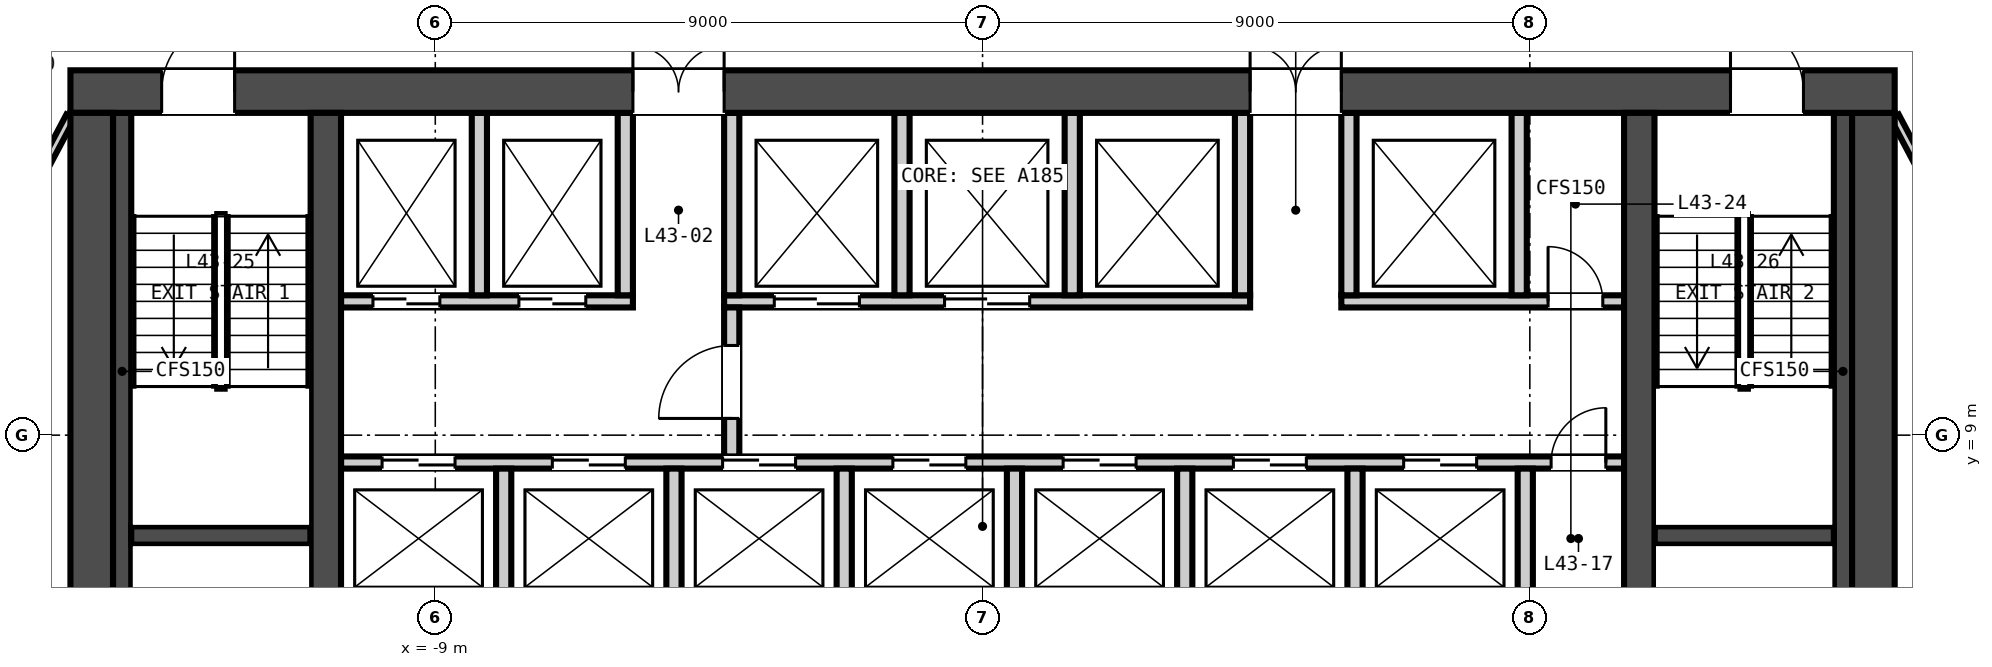
"""IFC4 building model, lengths in metres.
Left out: names, types, materials, properties, quantities, classifications, styles, units other than length and angle.
Written with IfcOpenShell. Run it as: python <this file> out.ifc"""

import sys

from ifc_helpers import new_model, si_unit, direction, frame, frame_2d, origin, place, context, subcontext, project, spatial, rectangle, extrude, element, fill, save


model = new_model("IFC4")
c1 = context("Model", 3, precision=1e-05, world=origin(), true_north=direction((0.0, 1.0)))
c2 = subcontext(c1, "Body", "Model", "MODEL_VIEW")
j1 = project(units=[si_unit("LENGTHUNIT", "METRE"), si_unit("PLANEANGLEUNIT", "RADIAN")], contexts=[c1])
p1 = place(None, origin())
s1 = spatial("IfcSite", under=j1, at=p1, CompositionType="ELEMENT")
p2 = place(p1, origin())
s2 = spatial("IfcBuilding", under=s1, at=p2, CompositionType="ELEMENT")
p3 = place(p2, frame((0.0, 0.0, 174.45)))
s3 = spatial("IfcBuildingStorey", under=s2, at=p3, CompositionType="ELEMENT", Elevation=174.45)
p4 = place(p3, frame((-15.0, 14.65, -0.15), z_axis=(0.0, 0.0, 1.0), x_axis=(1.0, 0.0, 0.0)))
e1 = element("IfcWall", 1, at=p4, inside=s3, PredefinedType="SOLIDWALL", context=c2, shape_type="SweptSolid", body=[
    extrude(rectangle(XDim=30.0, YDim=0.7, at=frame_2d((15.0, 0.0))), origin(), (0.0, 0.0, 1.0), 3.65),
])
p5 = place(p4, frame((9.25, 0.0, 0.15)))
e2 = element("IfcOpeningElement", 2, at=p5, cuts=e1, PredefinedType="OPENING", context=c2, shape_type="SweptSolid", body=[
    extrude(rectangle(XDim=1.5, YDim=2.1, at=frame_2d((0.75, 1.05))), frame((0.0, 0.36, 0.0), z_axis=(0.0, -1.0, 0.0), x_axis=(1.0, 0.0, 0.0)), (0.0, 0.0, 1.0), 0.72),
])
p6 = place(p4, frame((19.4, 0.0, 0.15)))
e3 = element("IfcOpeningElement", 3, at=p6, cuts=e1, PredefinedType="OPENING", context=c2, shape_type="SweptSolid", body=[
    extrude(rectangle(XDim=1.5, YDim=2.1, at=frame_2d((0.75, 1.05))), frame((0.0, 0.36, 0.0), z_axis=(0.0, -1.0, 0.0), x_axis=(1.0, 0.0, 0.0)), (0.0, 0.0, 1.0), 0.72),
])
p7 = place(p4, frame((1.5, 0.0, 0.15)))
e4 = element("IfcOpeningElement", 4, at=p7, cuts=e1, PredefinedType="OPENING", context=c2, shape_type="SweptSolid", body=[
    extrude(rectangle(XDim=1.2, YDim=2.1, at=frame_2d((0.6, 1.05))), frame((0.0, 0.36, 0.0), z_axis=(0.0, -1.0, 0.0), x_axis=(1.0, 0.0, 0.0)), (0.0, 0.0, 1.0), 0.72),
])
p8 = place(p4, frame((27.3, 0.0, 0.15)))
e5 = element("IfcOpeningElement", 5, at=p8, cuts=e1, PredefinedType="OPENING", context=c2, shape_type="SweptSolid", body=[
    extrude(rectangle(XDim=1.2, YDim=2.1, at=frame_2d((0.6, 1.05))), frame((0.0, 0.36, 0.0), z_axis=(0.0, -1.0, 0.0), x_axis=(1.0, 0.0, 0.0)), (0.0, 0.0, 1.0), 0.72),
])
for number, where, z_axis, x_axis in (
    (6, (-14.65, 0.7, -0.15), (0.0, 0.0, 1.0), (0.0, 1.0, 0.0)),
    (7, (14.65, 0.7, -0.15), (0.0, 0.0, 1.0), (0.0, 1.0, 0.0)),
):
    element("IfcWall", number, at=place(p3, frame(where, z_axis=z_axis, x_axis=x_axis)), inside=s3, PredefinedType="SOLIDWALL", context=c2, shape_type="SweptSolid", body=[
        extrude(rectangle(XDim=13.6, YDim=0.7, at=frame_2d((6.8, 0.0))), origin(), (0.0, 0.0, 1.0), 3.65),
    ])
for number, where, z_axis, x_axis in (
    (8, (-10.8, 0.7, -0.15), (0.0, 0.0, 1.0), (0.0, 1.0, 0.0)),
    (9, (10.8, 0.7, -0.15), (0.0, 0.0, 1.0), (0.0, 1.0, 0.0)),
):
    element("IfcWall", number, at=place(p3, frame(where, z_axis=z_axis, x_axis=x_axis)), inside=s3, PredefinedType="SOLIDWALL", context=c2, shape_type="SweptSolid", body=[
        extrude(rectangle(XDim=13.6, YDim=0.5, at=frame_2d((6.8, 0.0))), origin(), (0.0, 0.0, 1.0), 3.65),
    ])
p9 = place(p3, frame((-10.55, 8.55, 0.0), z_axis=(0.0, 0.0, 1.0), x_axis=(1.0, 0.0, 0.0)))
e10 = element("IfcWall", 10, at=p9, inside=s3, PredefinedType="PARTITIONING", context=c2, shape_type="SweptSolid", body=[
    extrude(rectangle(XDim=21.1, YDim=0.2, at=frame_2d((10.55, 0.0))), origin(), (0.0, 0.0, 1.0), 3.5),
])
p10 = place(p9, frame((0.675, 0.0, 0.0)))
e11 = element("IfcOpeningElement", 11, at=p10, cuts=e10, PredefinedType="OPENING", context=c2, shape_type="SweptSolid", body=[
    extrude(rectangle(XDim=1.2, YDim=2.1, at=frame_2d((0.6, 1.05))), frame((0.0, 0.11, 0.0), z_axis=(0.0, -1.0, 0.0), x_axis=(1.0, 0.0, 0.0)), (0.0, 0.0, 1.0), 0.22),
])
p11 = place(p9, frame((3.475, 0.0, 0.0)))
e12 = element("IfcOpeningElement", 12, at=p11, cuts=e10, PredefinedType="OPENING", context=c2, shape_type="SweptSolid", body=[
    extrude(rectangle(XDim=1.2, YDim=2.1, at=frame_2d((0.6, 1.05))), frame((0.0, 0.11, 0.0), z_axis=(0.0, -1.0, 0.0), x_axis=(1.0, 0.0, 0.0)), (0.0, 0.0, 1.0), 0.22),
])
p12 = place(p9, frame((6.275, 0.0, 0.0)))
e13 = element("IfcOpeningElement", 13, at=p12, cuts=e10, PredefinedType="OPENING", context=c2, shape_type="SweptSolid", body=[
    extrude(rectangle(XDim=1.2, YDim=2.1, at=frame_2d((0.6, 1.05))), frame((0.0, 0.11, 0.0), z_axis=(0.0, -1.0, 0.0), x_axis=(1.0, 0.0, 0.0)), (0.0, 0.0, 1.0), 0.22),
])
p13 = place(p9, frame((9.075, 0.0, 0.0)))
e14 = element("IfcOpeningElement", 14, at=p13, cuts=e10, PredefinedType="OPENING", context=c2, shape_type="SweptSolid", body=[
    extrude(rectangle(XDim=1.2, YDim=2.1, at=frame_2d((0.6, 1.05))), frame((0.0, 0.11, 0.0), z_axis=(0.0, -1.0, 0.0), x_axis=(1.0, 0.0, 0.0)), (0.0, 0.0, 1.0), 0.22),
])
p14 = place(p9, frame((11.875, 0.0, 0.0)))
e15 = element("IfcOpeningElement", 15, at=p14, cuts=e10, PredefinedType="OPENING", context=c2, shape_type="SweptSolid", body=[
    extrude(rectangle(XDim=1.2, YDim=2.1, at=frame_2d((0.6, 1.05))), frame((0.0, 0.11, 0.0), z_axis=(0.0, -1.0, 0.0), x_axis=(1.0, 0.0, 0.0)), (0.0, 0.0, 1.0), 0.22),
])
p15 = place(p9, frame((14.675, 0.0, 0.0)))
e16 = element("IfcOpeningElement", 16, at=p15, cuts=e10, PredefinedType="OPENING", context=c2, shape_type="SweptSolid", body=[
    extrude(rectangle(XDim=1.2, YDim=2.1, at=frame_2d((0.6, 1.05))), frame((0.0, 0.11, 0.0), z_axis=(0.0, -1.0, 0.0), x_axis=(1.0, 0.0, 0.0)), (0.0, 0.0, 1.0), 0.22),
])
p16 = place(p9, frame((17.475, 0.0, 0.0)))
e17 = element("IfcOpeningElement", 17, at=p16, cuts=e10, PredefinedType="OPENING", context=c2, shape_type="SweptSolid", body=[
    extrude(rectangle(XDim=1.2, YDim=2.1, at=frame_2d((0.6, 1.05))), frame((0.0, 0.11, 0.0), z_axis=(0.0, -1.0, 0.0), x_axis=(1.0, 0.0, 0.0)), (0.0, 0.0, 1.0), 0.22),
])
p17 = place(p9, frame((19.9, 0.0, 0.0)))
e18 = element("IfcOpeningElement", 18, at=p17, cuts=e10, PredefinedType="OPENING", context=c2, shape_type="SweptSolid", body=[
    extrude(rectangle(XDim=0.9, YDim=2.1, at=frame_2d((0.45, 1.05))), frame((0.0, 0.11, 0.0), z_axis=(0.0, -1.0, 0.0), x_axis=(1.0, 0.0, 0.0)), (0.0, 0.0, 1.0), 0.22),
])
p18 = place(p3, frame((-10.55, 11.2, 0.0), z_axis=(0.0, 0.0, 1.0), x_axis=(1.0, 0.0, 0.0)))
e19 = element("IfcWall", 19, at=p18, inside=s3, PredefinedType="PARTITIONING", context=c2, shape_type="SweptSolid", body=[
    extrude(rectangle(XDim=4.8, YDim=0.2, at=frame_2d((2.4, 0.0))), origin(), (0.0, 0.0, 1.0), 3.5),
])
p19 = place(p18, frame((0.525, 0.0, 0.0)))
e20 = element("IfcOpeningElement", 20, at=p19, cuts=e19, PredefinedType="OPENING", context=c2, shape_type="SweptSolid", body=[
    extrude(rectangle(XDim=1.1, YDim=2.1, at=frame_2d((0.55, 1.05))), frame((0.0, 0.11, 0.0), z_axis=(0.0, -1.0, 0.0), x_axis=(1.0, 0.0, 0.0)), (0.0, 0.0, 1.0), 0.22),
])
p20 = place(p18, frame((2.925, 0.0, 0.0)))
e21 = element("IfcOpeningElement", 21, at=p20, cuts=e19, PredefinedType="OPENING", context=c2, shape_type="SweptSolid", body=[
    extrude(rectangle(XDim=1.1, YDim=2.1, at=frame_2d((0.55, 1.05))), frame((0.0, 0.11, 0.0), z_axis=(0.0, -1.0, 0.0), x_axis=(1.0, 0.0, 0.0)), (0.0, 0.0, 1.0), 0.22),
])
p21 = place(p3, frame((-4.25, 11.2, 0.0), z_axis=(0.0, 0.0, 1.0), x_axis=(1.0, 0.0, 0.0)))
e22 = element("IfcWall", 22, at=p21, inside=s3, PredefinedType="PARTITIONING", context=c2, shape_type="SweptSolid", body=[
    extrude(rectangle(XDim=8.65, YDim=0.2, at=frame_2d((4.325, 0.0))), origin(), (0.0, 0.0, 1.0), 3.5),
])
p22 = place(p21, frame((0.825, 0.0, 0.0)))
e23 = element("IfcOpeningElement", 23, at=p22, cuts=e22, PredefinedType="OPENING", context=c2, shape_type="SweptSolid", body=[
    extrude(rectangle(XDim=1.4, YDim=2.1, at=frame_2d((0.7, 1.05))), frame((0.0, 0.11, 0.0), z_axis=(0.0, -1.0, 0.0), x_axis=(1.0, 0.0, 0.0)), (0.0, 0.0, 1.0), 0.22),
])
p23 = place(p21, frame((3.625, 0.0, 0.0)))
e24 = element("IfcOpeningElement", 24, at=p23, cuts=e22, PredefinedType="OPENING", context=c2, shape_type="SweptSolid", body=[
    extrude(rectangle(XDim=1.4, YDim=2.1, at=frame_2d((0.7, 1.05))), frame((0.0, 0.11, 0.0), z_axis=(0.0, -1.0, 0.0), x_axis=(1.0, 0.0, 0.0)), (0.0, 0.0, 1.0), 0.22),
])
p24 = place(p3, frame((5.9, 11.2, 0.0), z_axis=(0.0, 0.0, 1.0), x_axis=(1.0, 0.0, 0.0)))
e25 = element("IfcWall", 25, at=p24, inside=s3, PredefinedType="PARTITIONING", context=c2, shape_type="SweptSolid", body=[
    extrude(rectangle(XDim=4.65, YDim=0.2, at=frame_2d((2.325, 0.0))), origin(), (0.0, 0.0, 1.0), 3.5),
])
p25 = place(p24, frame((3.4, 0.0, 0.0)))
e26 = element("IfcOpeningElement", 26, at=p25, cuts=e25, PredefinedType="OPENING", context=c2, shape_type="SweptSolid", body=[
    extrude(rectangle(XDim=0.9, YDim=2.1, at=frame_2d((0.45, 1.05))), frame((0.0, 0.11, 0.0), z_axis=(0.0, -1.0, 0.0), x_axis=(1.0, 0.0, 0.0)), (0.0, 0.0, 1.0), 0.22),
])
p26 = place(p3, frame((-4.125, 8.65, 0.0), z_axis=(0.0, 0.0, 1.0), x_axis=(0.0, 1.0, 0.0)))
e27 = element("IfcWall", 27, at=p26, inside=s3, PredefinedType="PARTITIONING", context=c2, shape_type="SweptSolid", body=[
    extrude(rectangle(XDim=2.45, YDim=0.25, at=frame_2d((1.225, 0.0))), origin(), (0.0, 0.0, 1.0), 3.5),
])
p27 = place(p26, frame((0.625, 0.0, 0.0)))
e28 = element("IfcOpeningElement", 28, at=p27, cuts=e27, PredefinedType="OPENING", context=c2, shape_type="SweptSolid", body=[
    extrude(rectangle(XDim=1.2, YDim=2.1, at=frame_2d((0.6, 1.05))), frame((0.0, 0.135, 0.0), z_axis=(0.0, -1.0, 0.0), x_axis=(1.0, 0.0, 0.0)), (0.0, 0.0, 1.0), 0.27),
])
for number, where, z_axis, x_axis in (
    (29, (-7.875, 6.15, 0.0), (0.0, 0.0, 1.0), (0.0, 1.0, 0.0)),
    (30, (-5.075, 6.15, 0.0), (0.0, 0.0, 1.0), (0.0, 1.0, 0.0)),
    (31, (-2.275, 6.15, 0.0), (0.0, 0.0, 1.0), (0.0, 1.0, 0.0)),
    (32, (0.525, 6.15, 0.0), (0.0, 0.0, 1.0), (0.0, 1.0, 0.0)),
    (33, (3.325, 6.15, 0.0), (0.0, 0.0, 1.0), (0.0, 1.0, 0.0)),
    (34, (6.125, 6.15, 0.0), (0.0, 0.0, 1.0), (0.0, 1.0, 0.0)),
    (35, (8.925, 6.15, 0.0), (0.0, 0.0, 1.0), (0.0, 1.0, 0.0)),
):
    element("IfcWall", number, at=place(p3, frame(where, z_axis=z_axis, x_axis=x_axis)), inside=s3, PredefinedType="PARTITIONING", context=c2, shape_type="SweptSolid", body=[
        extrude(rectangle(XDim=2.3, YDim=0.25, at=frame_2d((1.15, 0.0))), origin(), (0.0, 0.0, 1.0), 3.5),
    ])
for number, where, z_axis, x_axis in (
    (36, (-8.275, 11.3, 0.0), (0.0, 0.0, 1.0), (0.0, 1.0, 0.0)),
    (37, (-5.875, 11.3, 0.0), (0.0, 0.0, 1.0), (0.0, 1.0, 0.0)),
    (38, (-4.125, 11.3, 0.0), (0.0, 0.0, 1.0), (0.0, 1.0, 0.0)),
    (39, (-1.325, 11.3, 0.0), (0.0, 0.0, 1.0), (0.0, 1.0, 0.0)),
    (40, (1.475, 11.3, 0.0), (0.0, 0.0, 1.0), (0.0, 1.0, 0.0)),
    (41, (4.275, 11.3, 0.0), (0.0, 0.0, 1.0), (0.0, 1.0, 0.0)),
    (42, (6.025, 11.3, 0.0), (0.0, 0.0, 1.0), (0.0, 1.0, 0.0)),
    (43, (8.825, 11.3, 0.0), (0.0, 0.0, 1.0), (0.0, 1.0, 0.0)),
):
    element("IfcWall", number, at=place(p3, frame(where, z_axis=z_axis, x_axis=x_axis)), inside=s3, PredefinedType="PARTITIONING", context=c2, shape_type="SweptSolid", body=[
        extrude(rectangle(XDim=3.0, YDim=0.25, at=frame_2d((1.5, 0.0))), origin(), (0.0, 0.0, 1.0), 3.5),
    ])
p28 = place(p3, frame((-14.0, 7.35, 0.0), z_axis=(0.0, 0.0, 1.0), x_axis=(1.0, 0.0, 0.0)))
e44 = element("IfcWall", 44, at=p28, inside=s3, PredefinedType="SOLIDWALL", context=c2, shape_type="SweptSolid", body=[
    extrude(rectangle(XDim=2.95, YDim=0.3, at=frame_2d((1.475, 0.0))), origin(), (0.0, 0.0, 1.0), 3.5),
])
p29 = place(p3, frame((-14.15, 0.7, 0.0), z_axis=(0.0, 0.0, 1.0), x_axis=(0.0, 1.0, 0.0)))
e45 = element("IfcWall", 45, at=p29, inside=s3, PredefinedType="SOLIDWALL", context=c2, shape_type="SweptSolid", body=[
    extrude(rectangle(XDim=13.6, YDim=0.3, at=frame_2d((6.8, 0.0))), origin(), (0.0, 0.0, 1.0), 3.5),
])
p30 = place(p3, frame((11.05, 7.35, 0.0), z_axis=(0.0, 0.0, 1.0), x_axis=(1.0, 0.0, 0.0)))
e46 = element("IfcWall", 46, at=p30, inside=s3, PredefinedType="SOLIDWALL", context=c2, shape_type="SweptSolid", body=[
    extrude(rectangle(XDim=2.95, YDim=0.3, at=frame_2d((1.475, 0.0))), origin(), (0.0, 0.0, 1.0), 3.5),
])
p31 = place(p3, frame((14.15, 0.7, 0.0), z_axis=(0.0, 0.0, 1.0), x_axis=(0.0, 1.0, 0.0)))
e47 = element("IfcWall", 47, at=p31, inside=s3, PredefinedType="SOLIDWALL", context=c2, shape_type="SweptSolid", body=[
    extrude(rectangle(XDim=13.6, YDim=0.3, at=frame_2d((6.8, 0.0))), origin(), (0.0, 0.0, 1.0), 3.5),
])
p32 = place(p3, frame((-15.0, 14.239, 0.0), z_axis=(0.0, 0.0, 1.0), x_axis=(-0.467834708812, -0.88381597928, 0.0)))
e48 = element("IfcWall", 48, at=p32, inside=s3, PredefinedType="PARTITIONING", context=c2, shape_type="SweptSolid", body=[
    extrude(rectangle(XDim=7.406, YDim=0.15, at=frame_2d((3.703, 0.0))), origin(), (0.0, 0.0, 1.0), 2.741),
])
p33 = place(p32, frame((3.203, 0.0, 0.0)))
e49 = element("IfcOpeningElement", 49, at=p33, cuts=e48, PredefinedType="OPENING", context=c2, shape_type="SweptSolid", body=[
    extrude(rectangle(XDim=1.0, YDim=2.1, at=frame_2d((0.5, 1.05))), frame((0.0, 0.085, 0.0), z_axis=(0.0, -1.0, 0.0), x_axis=(1.0, 0.0, 0.0)), (0.0, 0.0, 1.0), 0.17),
])
p34 = place(p3, frame((18.5, 7.627, 0.0), z_axis=(0.0, 0.0, 1.0), x_axis=(-0.467835241243, 0.883815697446, 0.0)))
e50 = element("IfcWall", 50, at=p34, inside=s3, PredefinedType="PARTITIONING", context=c2, shape_type="SweptSolid", body=[
    extrude(rectangle(XDim=7.481, YDim=0.15, at=frame_2d((3.741, 0.0))), origin(), (0.0, 0.0, 1.0), 2.741),
])
p35 = place(p34, frame((3.24, 0.0, 0.0)))
e51 = element("IfcOpeningElement", 51, at=p35, cuts=e50, PredefinedType="OPENING", context=c2, shape_type="SweptSolid", body=[
    extrude(rectangle(XDim=1.0, YDim=2.1, at=frame_2d((0.5, 1.05))), frame((0.0, 0.085, 0.0), z_axis=(0.0, -1.0, 0.0), x_axis=(1.0, 0.0, 0.0)), (0.0, 0.0, 1.0), 0.17),
])
p36 = place(p27, origin())
e52 = element("IfcDoor", 52, at=p36, inside=s3, OperationType="SINGLE_SWING_LEFT", PredefinedType="DOOR", context=c2, shape_type="SweptSolid", body=[
    extrude(rectangle(XDim=1.2, YDim=2.1, at=frame_2d((0.6, 1.05))), frame((0.0, 0.025, 0.0), z_axis=(0.0, -1.0, 0.0), x_axis=(1.0, 0.0, 0.0)), (0.0, 0.0, 1.0), 0.05),
])
fill(e28, e52)
p37 = place(p10, origin())
e53 = element("IfcDoor", 53, at=p37, inside=s3, OperationType="DOUBLE_DOOR_SLIDING", PredefinedType="DOOR", context=c2, shape_type="SweptSolid", body=[
    extrude(rectangle(XDim=1.2, YDim=2.1, at=frame_2d((0.6, 1.05))), frame((0.0, 0.025, 0.0), z_axis=(0.0, -1.0, 0.0), x_axis=(1.0, 0.0, 0.0)), (0.0, 0.0, 1.0), 0.05),
])
fill(e11, e53)
p38 = place(p11, origin())
e54 = element("IfcDoor", 54, at=p38, inside=s3, OperationType="DOUBLE_DOOR_SLIDING", PredefinedType="DOOR", context=c2, shape_type="SweptSolid", body=[
    extrude(rectangle(XDim=1.2, YDim=2.1, at=frame_2d((0.6, 1.05))), frame((0.0, 0.025, 0.0), z_axis=(0.0, -1.0, 0.0), x_axis=(1.0, 0.0, 0.0)), (0.0, 0.0, 1.0), 0.05),
])
fill(e12, e54)
p39 = place(p12, origin())
e55 = element("IfcDoor", 55, at=p39, inside=s3, OperationType="DOUBLE_DOOR_SLIDING", PredefinedType="DOOR", context=c2, shape_type="SweptSolid", body=[
    extrude(rectangle(XDim=1.2, YDim=2.1, at=frame_2d((0.6, 1.05))), frame((0.0, 0.025, 0.0), z_axis=(0.0, -1.0, 0.0), x_axis=(1.0, 0.0, 0.0)), (0.0, 0.0, 1.0), 0.05),
])
fill(e13, e55)
p40 = place(p13, origin())
e56 = element("IfcDoor", 56, at=p40, inside=s3, OperationType="DOUBLE_DOOR_SLIDING", PredefinedType="DOOR", context=c2, shape_type="SweptSolid", body=[
    extrude(rectangle(XDim=1.2, YDim=2.1, at=frame_2d((0.6, 1.05))), frame((0.0, 0.025, 0.0), z_axis=(0.0, -1.0, 0.0), x_axis=(1.0, 0.0, 0.0)), (0.0, 0.0, 1.0), 0.05),
])
fill(e14, e56)
p41 = place(p14, origin())
e57 = element("IfcDoor", 57, at=p41, inside=s3, OperationType="DOUBLE_DOOR_SLIDING", PredefinedType="DOOR", context=c2, shape_type="SweptSolid", body=[
    extrude(rectangle(XDim=1.2, YDim=2.1, at=frame_2d((0.6, 1.05))), frame((0.0, 0.025, 0.0), z_axis=(0.0, -1.0, 0.0), x_axis=(1.0, 0.0, 0.0)), (0.0, 0.0, 1.0), 0.05),
])
fill(e15, e57)
p42 = place(p15, origin())
e58 = element("IfcDoor", 58, at=p42, inside=s3, OperationType="DOUBLE_DOOR_SLIDING", PredefinedType="DOOR", context=c2, shape_type="SweptSolid", body=[
    extrude(rectangle(XDim=1.2, YDim=2.1, at=frame_2d((0.6, 1.05))), frame((0.0, 0.025, 0.0), z_axis=(0.0, -1.0, 0.0), x_axis=(1.0, 0.0, 0.0)), (0.0, 0.0, 1.0), 0.05),
])
fill(e16, e58)
p43 = place(p16, origin())
e59 = element("IfcDoor", 59, at=p43, inside=s3, OperationType="DOUBLE_DOOR_SLIDING", PredefinedType="DOOR", context=c2, shape_type="SweptSolid", body=[
    extrude(rectangle(XDim=1.2, YDim=2.1, at=frame_2d((0.6, 1.05))), frame((0.0, 0.025, 0.0), z_axis=(0.0, -1.0, 0.0), x_axis=(1.0, 0.0, 0.0)), (0.0, 0.0, 1.0), 0.05),
])
fill(e17, e59)
p44 = place(p17, origin())
e60 = element("IfcDoor", 60, at=p44, inside=s3, OperationType="SINGLE_SWING_RIGHT", PredefinedType="DOOR", context=c2, shape_type="SweptSolid", body=[
    extrude(rectangle(XDim=0.9, YDim=2.1, at=frame_2d((0.45, 1.05))), frame((0.0, 0.025, 0.0), z_axis=(0.0, -1.0, 0.0), x_axis=(1.0, 0.0, 0.0)), (0.0, 0.0, 1.0), 0.05),
])
fill(e18, e60)
p45 = place(p19, origin())
e61 = element("IfcDoor", 61, at=p45, inside=s3, OperationType="DOUBLE_DOOR_SLIDING", PredefinedType="DOOR", context=c2, shape_type="SweptSolid", body=[
    extrude(rectangle(XDim=1.1, YDim=2.1, at=frame_2d((0.55, 1.05))), frame((0.0, 0.025, 0.0), z_axis=(0.0, -1.0, 0.0), x_axis=(1.0, 0.0, 0.0)), (0.0, 0.0, 1.0), 0.05),
])
fill(e20, e61)
p46 = place(p20, origin())
e62 = element("IfcDoor", 62, at=p46, inside=s3, OperationType="DOUBLE_DOOR_SLIDING", PredefinedType="DOOR", context=c2, shape_type="SweptSolid", body=[
    extrude(rectangle(XDim=1.1, YDim=2.1, at=frame_2d((0.55, 1.05))), frame((0.0, 0.025, 0.0), z_axis=(0.0, -1.0, 0.0), x_axis=(1.0, 0.0, 0.0)), (0.0, 0.0, 1.0), 0.05),
])
fill(e21, e62)
p47 = place(p22, origin())
e63 = element("IfcDoor", 63, at=p47, inside=s3, OperationType="DOUBLE_DOOR_SLIDING", PredefinedType="DOOR", context=c2, shape_type="SweptSolid", body=[
    extrude(rectangle(XDim=1.4, YDim=2.1, at=frame_2d((0.7, 1.05))), frame((0.0, 0.025, 0.0), z_axis=(0.0, -1.0, 0.0), x_axis=(1.0, 0.0, 0.0)), (0.0, 0.0, 1.0), 0.05),
])
fill(e23, e63)
p48 = place(p23, origin())
e64 = element("IfcDoor", 64, at=p48, inside=s3, OperationType="DOUBLE_DOOR_SLIDING", PredefinedType="DOOR", context=c2, shape_type="SweptSolid", body=[
    extrude(rectangle(XDim=1.4, YDim=2.1, at=frame_2d((0.7, 1.05))), frame((0.0, 0.025, 0.0), z_axis=(0.0, -1.0, 0.0), x_axis=(1.0, 0.0, 0.0)), (0.0, 0.0, 1.0), 0.05),
])
fill(e24, e64)
p49 = place(p25, origin())
e65 = element("IfcDoor", 65, at=p49, inside=s3, OperationType="SINGLE_SWING_LEFT", PredefinedType="DOOR", context=c2, shape_type="SweptSolid", body=[
    extrude(rectangle(XDim=0.9, YDim=2.1, at=frame_2d((0.45, 1.05))), frame((0.0, 0.025, 0.0), z_axis=(0.0, -1.0, 0.0), x_axis=(1.0, 0.0, 0.0)), (0.0, 0.0, 1.0), 0.05),
])
fill(e26, e65)
p50 = place(p5, origin())
e66 = element("IfcDoor", 66, at=p50, inside=s3, OperationType="DOUBLE_DOOR_SINGLE_SWING", PredefinedType="DOOR", context=c2, shape_type="SweptSolid", body=[
    extrude(rectangle(XDim=1.5, YDim=2.1, at=frame_2d((0.75, 1.05))), frame((0.0, 0.025, 0.0), z_axis=(0.0, -1.0, 0.0), x_axis=(1.0, 0.0, 0.0)), (0.0, 0.0, 1.0), 0.05),
])
fill(e2, e66)
p51 = place(p6, origin())
e67 = element("IfcDoor", 67, at=p51, inside=s3, OperationType="DOUBLE_DOOR_SINGLE_SWING", PredefinedType="DOOR", context=c2, shape_type="SweptSolid", body=[
    extrude(rectangle(XDim=1.5, YDim=2.1, at=frame_2d((0.75, 1.05))), frame((0.0, 0.025, 0.0), z_axis=(0.0, -1.0, 0.0), x_axis=(1.0, 0.0, 0.0)), (0.0, 0.0, 1.0), 0.05),
])
fill(e3, e67)
p52 = place(p7, origin())
e68 = element("IfcDoor", 68, at=p52, inside=s3, OperationType="SINGLE_SWING_RIGHT", PredefinedType="DOOR", context=c2, shape_type="SweptSolid", body=[
    extrude(rectangle(XDim=1.2, YDim=2.1, at=frame_2d((0.6, 1.05))), frame((0.0, 0.025, 0.0), z_axis=(0.0, -1.0, 0.0), x_axis=(1.0, 0.0, 0.0)), (0.0, 0.0, 1.0), 0.05),
])
fill(e4, e68)
p53 = place(p8, origin())
e69 = element("IfcDoor", 69, at=p53, inside=s3, OperationType="SINGLE_SWING_LEFT", PredefinedType="DOOR", context=c2, shape_type="SweptSolid", body=[
    extrude(rectangle(XDim=1.2, YDim=2.1, at=frame_2d((0.6, 1.05))), frame((0.0, 0.025, 0.0), z_axis=(0.0, -1.0, 0.0), x_axis=(1.0, 0.0, 0.0)), (0.0, 0.0, 1.0), 0.05),
])
fill(e5, e69)
save(model, sys.argv[1])
